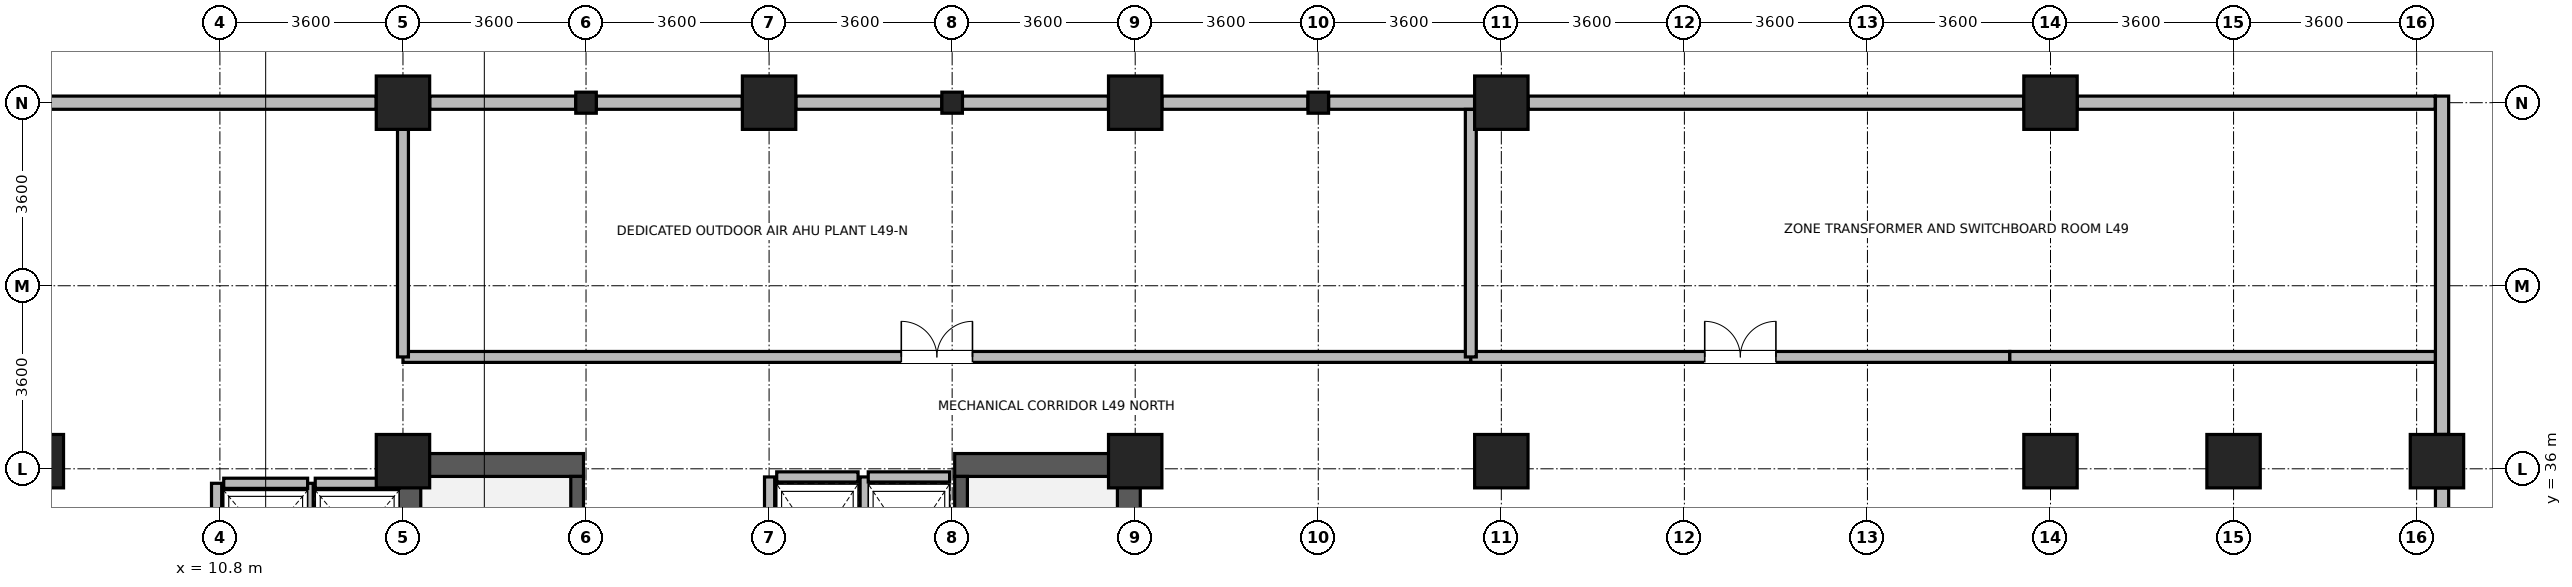
"""IFC4 building model, lengths in metres.
Left out: names, types, materials, properties, quantities, classifications, styles, units other than length and angle.
Written with IfcOpenShell. Run it as: python <this file> out.ifc"""

import sys

from ifc_helpers import new_model, si_unit, direction, frame, frame_2d, origin, origin_2d, place, context, subcontext, project, spatial, rectangle, i_section, extrude, source, transform, mapped, element, fill, save


model = new_model("IFC4")
c1 = context("Model", 3, precision=1e-05, world=origin(), true_north=direction((0.0, 1.0)))
c2 = subcontext(c1, "Body", "Model", "MODEL_VIEW")
j1 = project(units=[si_unit("LENGTHUNIT", "METRE"), si_unit("PLANEANGLEUNIT", "RADIAN")], contexts=[c1])
p1 = place(None, origin())
s1 = spatial("IfcSite", under=j1, at=p1, CompositionType="ELEMENT")
p2 = place(p1, origin())
s2 = spatial("IfcBuilding", under=s1, at=p2, CompositionType="ELEMENT")
p3 = place(p2, frame((0.0, 0.0, 192.0)))
s3 = spatial("IfcBuildingStorey", under=s2, at=p3, CompositionType="ELEMENT", Elevation=192.0)
for number, where, z_axis, x_axis in (
    (1, (14.525, 28.4, 0.0), (0.0, 0.0, 1.0), (0.0, 1.0, 0.0)),
    (2, (28.675, 28.4, 0.0), (0.0, 0.0, 1.0), (0.0, 1.0, 0.0)),
):
    element("IfcWall", number, at=place(p3, frame(where, z_axis=z_axis, x_axis=x_axis)), inside=s3, PredefinedType="SHEAR", context=c2, shape_type="SweptSolid", body=[
        extrude(rectangle(XDim=7.9, YDim=0.45, at=frame_2d((3.95, 0.0))), origin(), (0.0, 0.0, 1.0), 4.78),
    ])
for number, where, z_axis, x_axis in (
    (3, (14.75, 36.075, 0.0), (0.0, 0.0, 1.0), (1.0, 0.0, 0.0)),
    (4, (25.25, 36.075, 0.0), (0.0, 0.0, 1.0), (1.0, 0.0, 0.0)),
):
    element("IfcWall", number, at=place(p3, frame(where, z_axis=z_axis, x_axis=x_axis)), inside=s3, PredefinedType="SHEAR", context=c2, shape_type="SweptSolid", body=[
        extrude(rectangle(XDim=3.2, YDim=0.45, at=frame_2d((1.6, 0.0))), origin(), (0.0, 0.0, 1.0), 4.78),
    ])
p4 = place(p3, frame((17.825, 28.85, 0.0), z_axis=(0.0, 0.0, 1.0), x_axis=(0.0, 1.0, 0.0)))
e5 = element("IfcWall", 5, at=p4, inside=s3, PredefinedType="SHEAR", context=c2, shape_type="SweptSolid", body=[
    extrude(rectangle(XDim=7.0, YDim=0.25, at=frame_2d((3.5, 0.0))), origin(), (0.0, 0.0, 1.0), 4.78),
])
p5 = place(p4, frame((0.15, 0.0, 0.0)))
e6 = element("IfcOpeningElement", 6, at=p5, cuts=e5, PredefinedType="OPENING", context=c2, shape_type="SweptSolid", body=[
    extrude(rectangle(XDim=1.1, YDim=2.08, at=frame_2d((0.55, 1.04))), frame((0.0, 0.135, 0.0), z_axis=(0.0, -1.0, 0.0), x_axis=(1.0, 0.0, 0.0)), (0.0, 0.0, 1.0), 0.27),
])
p6 = place(p3, frame((25.375, 28.85, 0.0), z_axis=(0.0, 0.0, 1.0), x_axis=(0.0, 1.0, 0.0)))
e7 = element("IfcWall", 7, at=p6, inside=s3, PredefinedType="SHEAR", context=c2, shape_type="SweptSolid", body=[
    extrude(rectangle(XDim=7.0, YDim=0.25, at=frame_2d((3.5, 0.0))), origin(), (0.0, 0.0, 1.0), 4.78),
])
p7 = place(p6, frame((0.15, 0.0, 0.0)))
e8 = element("IfcOpeningElement", 8, at=p7, cuts=e7, PredefinedType="OPENING", context=c2, shape_type="SweptSolid", body=[
    extrude(rectangle(XDim=1.1, YDim=2.08, at=frame_2d((0.55, 1.04))), frame((0.0, 0.135, 0.0), z_axis=(0.0, -1.0, 0.0), x_axis=(1.0, 0.0, 0.0)), (0.0, 0.0, 1.0), 0.27),
])
m1 = source(origin(), c2, "Body", "SweptSolid", [
    extrude(rectangle(XDim=1.05, YDim=1.05, at=origin_2d()), origin(), (0.0, 0.0, 1.0), 5.2),
])
for number, where, z_axis, x_axis in (
    (9, (7.2, 36.15, 0.0), (0.0, 0.0, 1.0), (1.0, 0.0, 0.0)),
    (10, (14.4, 36.15, 0.0), (0.0, 0.0, 1.0), (1.0, 0.0, 0.0)),
    (11, (14.4, 43.2, 0.0), (0.0, 0.0, 1.0), (1.0, 0.0, 0.0)),
    (12, (21.6, 43.2, 0.0), (0.0, 0.0, 1.0), (1.0, 0.0, 0.0)),
    (13, (28.8, 36.15, 0.0), (0.0, 0.0, 1.0), (1.0, 0.0, 0.0)),
    (14, (28.8, 43.2, 0.0), (0.0, 0.0, 1.0), (1.0, 0.0, 0.0)),
    (15, (36.0, 43.2, 0.0), (0.0, 0.0, 1.0), (1.0, 0.0, 0.0)),
    (16, (36.0, 36.15, 0.0), (0.0, 0.0, 1.0), (1.0, 0.0, 0.0)),
    (17, (46.8, 36.15, 0.0), (0.0, 0.0, 1.0), (1.0, 0.0, 0.0)),
    (18, (46.8, 43.2, 0.0), (0.0, 0.0, 1.0), (1.0, 0.0, 0.0)),
    (19, (50.4, 36.15, 0.0), (0.0, 0.0, 1.0), (1.0, 0.0, 0.0)),
    (20, (54.4, 36.15, 0.0), (0.0, 0.0, 1.0), (1.0, 0.0, 0.0)),
):
    element("IfcColumn", number, at=place(p3, frame(where, z_axis=z_axis, x_axis=x_axis)), inside=s3, PredefinedType="COLUMN", context=c2, shape_type="MappedRepresentation", body=[
        mapped(m1, transform((0.0, 0.0, 0.0), x_axis=(1.0, 0.0, 0.0), y_axis=(0.0, 1.0, 0.0), z_axis=(0.0, 0.0, 1.0), scale=1.0)),
    ])
m2 = source(origin(), c2, "Body", "SweptSolid", [
    extrude(i_section(OverallWidth=0.404, OverallDepth=0.414, WebThickness=0.021, FlangeThickness=0.028, FilletRadius=0.015, at=origin_2d()), origin(), (0.0, 0.0, 1.0), 5.2),
])
for number, where, z_axis, x_axis in (
    (21, (18.0, 43.2, 0.0), (0.0, 0.0, 1.0), (1.0, 0.0, 0.0)),
    (22, (25.2, 43.2, 0.0), (0.0, 0.0, 1.0), (1.0, 0.0, 0.0)),
    (23, (32.4, 43.2, 0.0), (0.0, 0.0, 1.0), (1.0, 0.0, 0.0)),
):
    element("IfcColumn", number, at=place(p3, frame(where, z_axis=z_axis, x_axis=x_axis)), inside=s3, PredefinedType="COLUMN", context=c2, shape_type="MappedRepresentation", body=[
        mapped(m2, transform((0.0, 0.0, 0.0), x_axis=(1.0, 0.0, 0.0), y_axis=(0.0, 1.0, 0.0), z_axis=(0.0, 0.0, 1.0), scale=1.0)),
    ])
p8 = place(p3, frame((54.5, 35.624, 0.0), z_axis=(0.0, 0.0, 1.0), x_axis=(0.0, -1.0, 0.0)))
e24 = element("IfcWall", 24, at=p8, inside=s3, PredefinedType="STANDARD", context=c2, shape_type="SweptSolid", body=[
    extrude(rectangle(XDim=6.448, YDim=0.26, at=frame_2d((3.224, 0.0))), origin(), (0.0, 0.0, 1.0), 2.96),
])
p9 = place(p3, frame((54.5, 43.33, 0.0), z_axis=(0.0, 0.0, 1.0), x_axis=(0.0, -1.0, 0.0)))
e25 = element("IfcWall", 25, at=p9, inside=s3, PredefinedType="STANDARD", context=c2, shape_type="SweptSolid", body=[
    extrude(rectangle(XDim=6.654, YDim=0.26, at=frame_2d((3.327, 0.0))), origin(), (0.0, 0.0, 1.0), 4.76),
])
p10 = place(p3, frame((47.326, 43.2, 0.0), z_axis=(0.0, 0.0, 1.0), x_axis=(1.0, 0.0, 0.0)))
e26 = element("IfcWall", 26, at=p10, inside=s3, PredefinedType="STANDARD", context=c2, shape_type="SweptSolid", body=[
    extrude(rectangle(XDim=7.039, YDim=0.26, at=frame_2d((3.52, 0.0))), origin(), (0.0, 0.0, 1.0), 4.76),
])
p11 = place(p3, frame((36.526, 43.2, 0.0), z_axis=(0.0, 0.0, 1.0), x_axis=(1.0, 0.0, 0.0)))
e27 = element("IfcWall", 27, at=p11, inside=s3, PredefinedType="STANDARD", context=c2, shape_type="SweptSolid", body=[
    extrude(rectangle(XDim=9.748, YDim=0.26, at=frame_2d((4.874, 0.0))), origin(), (0.0, 0.0, 1.0), 2.96),
])
for number, where, z_axis, x_axis in (
    (28, (32.603, 43.2, 0.0), (0.0, 0.0, 1.0), (1.0, 0.0, 0.0)),
    (29, (29.326, 43.2, 0.0), (0.0, 0.0, 1.0), (1.0, 0.0, 0.0)),
):
    element("IfcWall", number, at=place(p3, frame(where, z_axis=z_axis, x_axis=x_axis)), inside=s3, PredefinedType="STANDARD", context=c2, shape_type="SweptSolid", body=[
        extrude(rectangle(XDim=2.871, YDim=0.26, at=frame_2d((1.436, 0.0))), origin(), (0.0, 0.0, 1.0), 2.96),
    ])
p12 = place(p3, frame((25.403, 43.2, 0.0), z_axis=(0.0, 0.0, 1.0), x_axis=(1.0, 0.0, 0.0)))
e30 = element("IfcWall", 30, at=p12, inside=s3, PredefinedType="STANDARD", context=c2, shape_type="SweptSolid", body=[
    extrude(rectangle(XDim=2.871, YDim=0.26, at=frame_2d((1.436, 0.0))), origin(), (0.0, 0.0, 1.0), 2.96),
])
for number, where, z_axis, x_axis in (
    (31, (22.126, 43.2, 0.0), (0.0, 0.0, 1.0), (1.0, 0.0, 0.0)),
    (32, (18.203, 43.2, 0.0), (0.0, 0.0, 1.0), (1.0, 0.0, 0.0)),
    (33, (14.926, 43.2, 0.0), (0.0, 0.0, 1.0), (1.0, 0.0, 0.0)),
):
    element("IfcWall", number, at=place(p3, frame(where, z_axis=z_axis, x_axis=x_axis)), inside=s3, PredefinedType="STANDARD", context=c2, shape_type="SweptSolid", body=[
        extrude(rectangle(XDim=2.871, YDim=0.26, at=frame_2d((1.436, 0.0))), origin(), (0.0, 0.0, 1.0), 2.96),
    ])
p13 = place(p3, frame((0.635, 43.2, 0.0), z_axis=(0.0, 0.0, 1.0), x_axis=(1.0, 0.0, 0.0)))
e34 = element("IfcWall", 34, at=p13, inside=s3, PredefinedType="STANDARD", context=c2, shape_type="SweptSolid", body=[
    extrude(rectangle(XDim=13.239, YDim=0.26, at=frame_2d((6.62, 0.0))), origin(), (0.0, 0.0, 1.0), 4.76),
])
p14 = place(p3, frame((12.675, 35.715, 0.0), z_axis=(0.0, 0.0, 1.0), x_axis=(1.0, 0.0, 0.0)))
e35 = element("IfcWall", 35, at=p14, inside=s3, PredefinedType="PARTITIONING", context=c2, shape_type="SweptSolid", body=[
    extrude(rectangle(XDim=1.65, YDim=0.2, at=frame_2d((0.825, 0.0))), origin(), (0.0, 0.0, 1.0), 4.76),
])
p15 = place(p3, frame((12.535, 33.485, 0.0), z_axis=(0.0, 0.0, 1.0), x_axis=(0.0, 1.0, 0.0)))
e36 = element("IfcWall", 36, at=p15, inside=s3, PredefinedType="PARTITIONING", context=c2, shape_type="SweptSolid", body=[
    extrude(rectangle(XDim=2.23, YDim=0.2, at=frame_2d((1.115, 0.0))), origin(), (0.0, 0.0, 1.0), 4.76),
])
p16 = place(p3, frame((10.875, 35.715, 0.0), z_axis=(0.0, 0.0, 1.0), x_axis=(1.0, 0.0, 0.0)))
e37 = element("IfcWall", 37, at=p16, inside=s3, PredefinedType="PARTITIONING", context=c2, shape_type="SweptSolid", body=[
    extrude(rectangle(XDim=1.65, YDim=0.2, at=frame_2d((0.825, 0.0))), origin(), (0.0, 0.0, 1.0), 4.76),
])
p17 = place(p3, frame((10.735, 33.485, 0.0), z_axis=(0.0, 0.0, 1.0), x_axis=(0.0, 1.0, 0.0)))
e38 = element("IfcWall", 38, at=p17, inside=s3, PredefinedType="PARTITIONING", context=c2, shape_type="SweptSolid", body=[
    extrude(rectangle(XDim=2.23, YDim=0.2, at=frame_2d((1.115, 0.0))), origin(), (0.0, 0.0, 1.0), 4.76),
])
p18 = place(p3, frame((21.75, 35.84, 0.0), z_axis=(0.0, 0.0, 1.0), x_axis=(1.0, 0.0, 0.0)))
e39 = element("IfcWall", 39, at=p18, inside=s3, PredefinedType="PARTITIONING", context=c2, shape_type="SweptSolid", body=[
    extrude(rectangle(XDim=1.6, YDim=0.2, at=frame_2d((0.8, 0.0))), origin(), (0.0, 0.0, 1.0), 3.76),
])
for number, where, z_axis, x_axis in (
    (40, (21.61, 33.16, 0.0), (0.0, 0.0, 1.0), (0.0, 1.0, 0.0)),
    (41, (23.49, 33.16, 0.0), (0.0, 0.0, 1.0), (0.0, 1.0, 0.0)),
):
    element("IfcWall", number, at=place(p3, frame(where, z_axis=z_axis, x_axis=x_axis)), inside=s3, PredefinedType="PARTITIONING", context=c2, shape_type="SweptSolid", body=[
        extrude(rectangle(XDim=2.68, YDim=0.2, at=frame_2d((1.34, 0.0))), origin(), (0.0, 0.0, 1.0), 4.76),
    ])
p19 = place(p3, frame((23.55, 35.84, 0.0), z_axis=(0.0, 0.0, 1.0), x_axis=(1.0, 0.0, 0.0)))
e42 = element("IfcWall", 42, at=p19, inside=s3, PredefinedType="PARTITIONING", context=c2, shape_type="SweptSolid", body=[
    extrude(rectangle(XDim=1.6, YDim=0.2, at=frame_2d((0.8, 0.0))), origin(), (0.0, 0.0, 1.0), 3.76),
])
p20 = place(p3, frame((14.4, 38.2, 0.0), z_axis=(0.0, 0.0, 1.0), x_axis=(1.0, 0.0, 0.0)))
e43 = element("IfcWall", 43, at=p20, inside=s3, PredefinedType="PARTITIONING", context=c2, shape_type="SweptSolid", body=[
    extrude(rectangle(XDim=21.0, YDim=0.215, at=frame_2d((10.5, 0.0))), origin(), (0.0, 0.0, 1.0), 4.76),
])
p21 = place(p20, frame((9.8, 0.0, 0.0)))
e44 = element("IfcOpeningElement", 44, at=p21, cuts=e43, PredefinedType="OPENING", context=c2, shape_type="SweptSolid", body=[
    extrude(rectangle(XDim=1.4, YDim=2.15, at=frame_2d((0.7, 1.075))), frame((0.0, 0.118, 0.0), z_axis=(0.0, -1.0, 0.0), x_axis=(1.0, 0.0, 0.0)), (0.0, 0.0, 1.0), 0.235),
])
p22 = place(p3, frame((35.4, 38.2, 0.0), z_axis=(0.0, 0.0, 1.0), x_axis=(1.0, 0.0, 0.0)))
e45 = element("IfcWall", 45, at=p22, inside=s3, PredefinedType="PARTITIONING", context=c2, shape_type="SweptSolid", body=[
    extrude(rectangle(XDim=10.6, YDim=0.215, at=frame_2d((5.3, 0.0))), origin(), (0.0, 0.0, 1.0), 4.76),
])
p23 = place(p22, frame((4.6, 0.0, 0.0)))
e46 = element("IfcOpeningElement", 46, at=p23, cuts=e45, PredefinedType="OPENING", context=c2, shape_type="SweptSolid", body=[
    extrude(rectangle(XDim=1.4, YDim=2.15, at=frame_2d((0.7, 1.075))), frame((0.0, 0.118, 0.0), z_axis=(0.0, -1.0, 0.0), x_axis=(1.0, 0.0, 0.0)), (0.0, 0.0, 1.0), 0.235),
])
p24 = place(p3, frame((46.0, 38.2, 0.0), z_axis=(0.0, 0.0, 1.0), x_axis=(1.0, 0.0, 0.0)))
e47 = element("IfcWall", 47, at=p24, inside=s3, PredefinedType="PARTITIONING", context=c2, shape_type="SweptSolid", body=[
    extrude(rectangle(XDim=8.368, YDim=0.215, at=frame_2d((4.184, 0.0))), origin(), (0.0, 0.0, 1.0), 4.76),
])
p25 = place(p3, frame((14.4, 38.2, 0.0), z_axis=(0.0, 0.0, 1.0), x_axis=(0.0, 1.0, 0.0)))
e48 = element("IfcWall", 48, at=p25, inside=s3, PredefinedType="PARTITIONING", context=c2, shape_type="SweptSolid", body=[
    extrude(rectangle(XDim=4.475, YDim=0.215, at=frame_2d((2.238, 0.0))), origin(), (0.0, 0.0, 1.0), 4.76),
])
p26 = place(p3, frame((35.4, 38.2, 0.0), z_axis=(0.0, 0.0, 1.0), x_axis=(0.0, 1.0, 0.0)))
e49 = element("IfcWall", 49, at=p26, inside=s3, PredefinedType="PARTITIONING", context=c2, shape_type="SweptSolid", body=[
    extrude(rectangle(XDim=4.868, YDim=0.215, at=frame_2d((2.434, 0.0))), origin(), (0.0, 0.0, 1.0), 4.76),
])
p27 = place(p21, origin())
e50 = element("IfcDoor", 50, at=p27, inside=s3, OperationType="DOUBLE_DOOR_SINGLE_SWING", PredefinedType="DOOR", context=c2, shape_type="SweptSolid", body=[
    extrude(rectangle(XDim=1.4, YDim=2.15, at=frame_2d((0.7, 1.075))), frame((0.0, 0.025, 0.0), z_axis=(0.0, -1.0, 0.0), x_axis=(1.0, 0.0, 0.0)), (0.0, 0.0, 1.0), 0.05),
])
fill(e44, e50)
p28 = place(p23, origin())
e51 = element("IfcDoor", 51, at=p28, inside=s3, OperationType="DOUBLE_DOOR_SINGLE_SWING", PredefinedType="DOOR", context=c2, shape_type="SweptSolid", body=[
    extrude(rectangle(XDim=1.4, YDim=2.15, at=frame_2d((0.7, 1.075))), frame((0.0, 0.025, 0.0), z_axis=(0.0, -1.0, 0.0), x_axis=(1.0, 0.0, 0.0)), (0.0, 0.0, 1.0), 0.05),
])
fill(e46, e51)
save(model, sys.argv[1])
